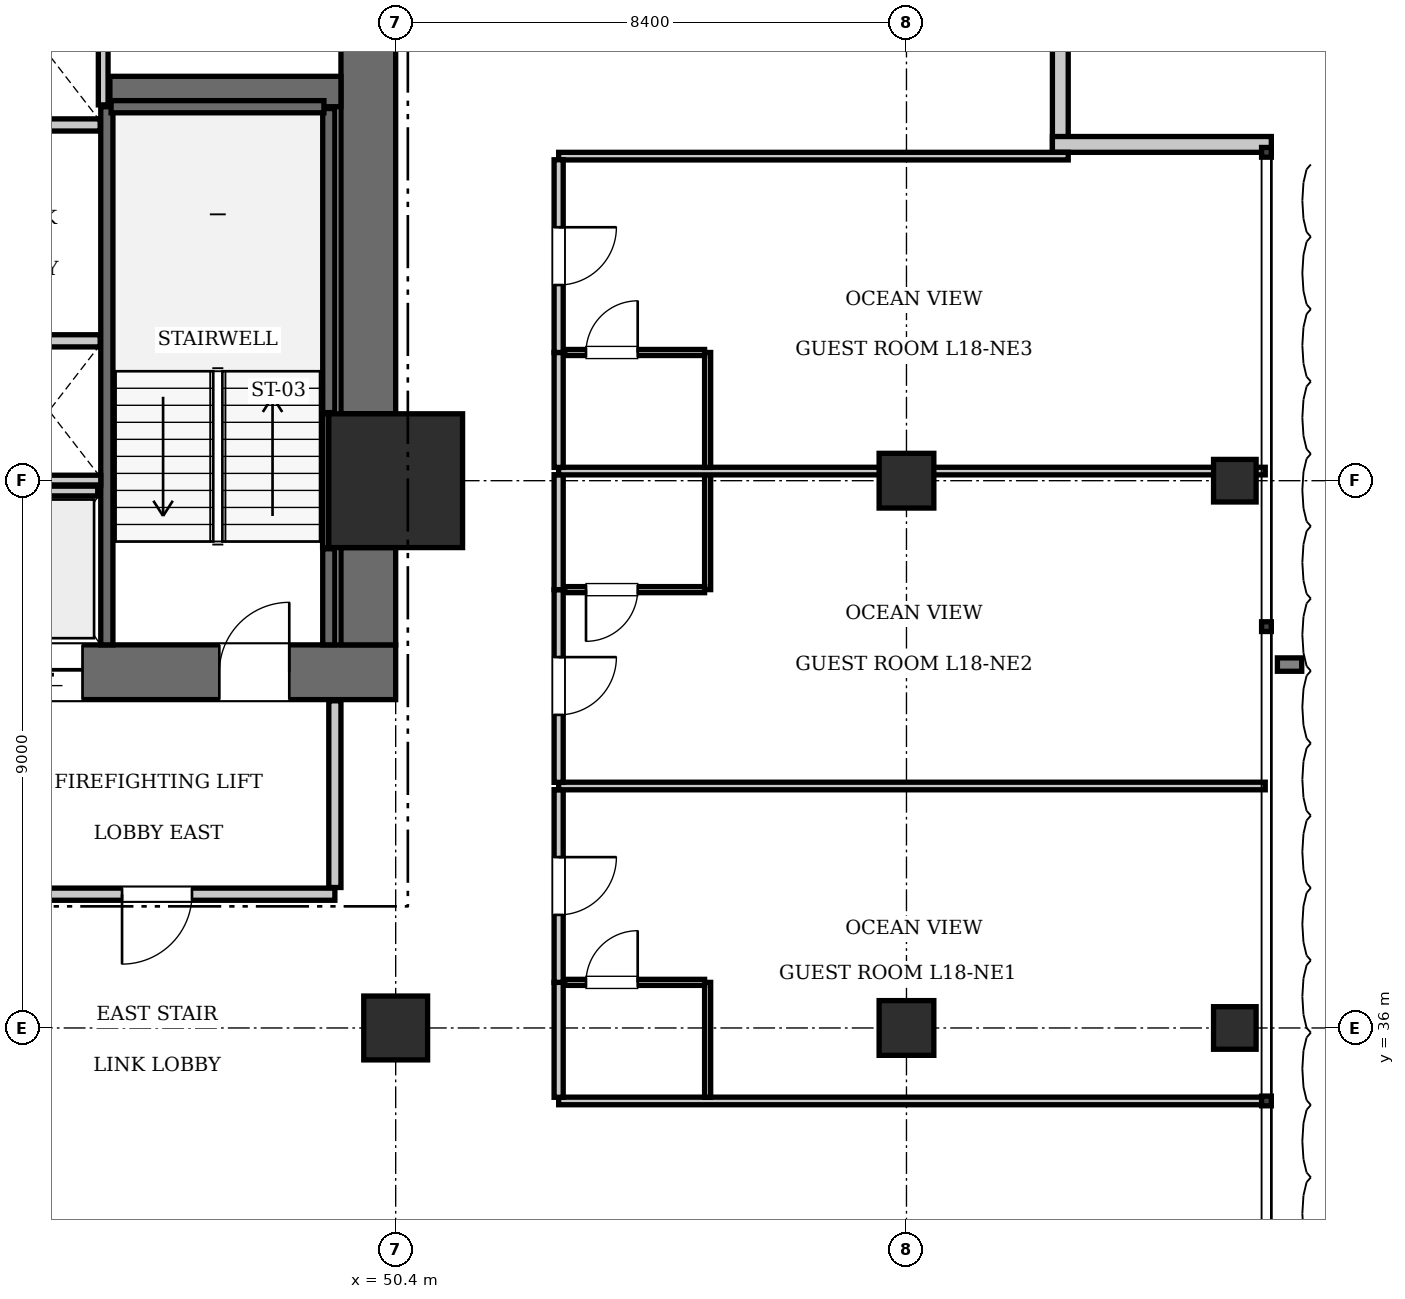
"""IFC4 building model, lengths in metres.
Left out: names, types, materials, properties, quantities, classifications, styles, units other than length and angle.
Written with IfcOpenShell. Run it as: python <this file> out.ifc"""

import sys

from ifc_helpers import new_model, si_unit, direction, frame, frame_2d, origin, origin_2d, place, context, subcontext, project, spatial, rectangle, i_section, extrude, element, fill, save


model = new_model("IFC4")
c1 = context("Model", 3, precision=1e-05, world=origin(), true_north=direction((0.0, 1.0)))
c2 = subcontext(c1, "Body", "Model", "MODEL_VIEW")
j1 = project(units=[si_unit("LENGTHUNIT", "METRE"), si_unit("PLANEANGLEUNIT", "RADIAN")], contexts=[c1])
p1 = place(None, origin())
s1 = spatial("IfcSite", under=j1, at=p1, CompositionType="ELEMENT")
p2 = place(p1, origin())
s2 = spatial("IfcBuilding", under=s1, at=p2, CompositionType="ELEMENT")
p3 = place(p2, frame((0.0, 0.0, 77.0)))
s3 = spatial("IfcBuildingStorey", under=s2, at=p3, CompositionType="ELEMENT", Elevation=77.0)
p4 = place(p3, frame((50.4, 45.0, 0.0), z_axis=(0.0, 0.0, 1.0), x_axis=(1.0, 0.0, 0.0)))
e1 = element("IfcColumn", 1, at=p4, inside=s3, PredefinedType="COLUMN", context=c2, shape_type="SweptSolid", body=[
    extrude(rectangle(XDim=2.2, YDim=2.2, at=origin_2d()), origin(), (0.0, 0.0, 1.0), 3.85),
])
p5 = place(p3, frame((43.6, 41.85, 0.0), z_axis=(0.0, 0.0, 1.0), x_axis=(1.0, 0.0, 0.0)))
e2 = element("IfcWall", 2, at=p5, inside=s3, PredefinedType="SHEAR", context=c2, shape_type="SweptSolid", body=[
    extrude(rectangle(XDim=6.8, YDim=0.9, at=frame_2d((3.4, 0.0))), origin(), (0.0, 0.0, 1.0), 3.85),
])
p6 = place(p5, frame((3.9, 0.0, 0.0)))
e3 = element("IfcOpeningElement", 3, at=p6, cuts=e2, PredefinedType="OPENING", context=c2, shape_type="SweptSolid", body=[
    extrude(rectangle(XDim=1.15, YDim=2.15, at=frame_2d((0.575, 1.075))), frame((0.0, 0.46, 0.0), z_axis=(0.0, -1.0, 0.0), x_axis=(1.0, 0.0, 0.0)), (0.0, 0.0, 1.0), 0.92),
])
p7 = place(p5, frame((0.55, 0.0, 0.0)))
e4 = element("IfcOpeningElement", 4, at=p7, cuts=e2, PredefinedType="OPENING", context=c2, shape_type="SweptSolid", body=[
    extrude(rectangle(XDim=1.1, YDim=2.2, at=frame_2d((0.55, 1.1))), frame((0.0, 0.46, 0.0), z_axis=(0.0, -1.0, 0.0), x_axis=(1.0, 0.0, 0.0)), (0.0, 0.0, 1.0), 0.92),
])
p8 = place(p3, frame((49.95, 42.3, 0.0), z_axis=(0.0, 0.0, 1.0), x_axis=(0.0, 1.0, 0.0)))
e5 = element("IfcWall", 5, at=p8, inside=s3, PredefinedType="SHEAR", context=c2, shape_type="SweptSolid", body=[
    extrude(rectangle(XDim=1.6, YDim=0.9, at=frame_2d((0.8, 0.0))), origin(), (0.0, 0.0, 1.0), 3.85),
])
p9 = place(p3, frame((49.95, 46.1, 0.0), z_axis=(0.0, 0.0, 1.0), x_axis=(0.0, 1.0, 0.0)))
e6 = element("IfcWall", 6, at=p9, inside=s3, PredefinedType="SHEAR", context=c2, shape_type="SweptSolid", body=[
    extrude(rectangle(XDim=7.0, YDim=0.9, at=frame_2d((3.5, 0.0))), origin(), (0.0, 0.0, 1.0), 3.85),
])
p10 = place(p3, frame((45.7, 51.4, 0.0), z_axis=(0.0, 0.0, 1.0), x_axis=(1.0, 0.0, 0.0)))
e7 = element("IfcWall", 7, at=p10, inside=s3, PredefinedType="SHEAR", context=c2, shape_type="SweptSolid", body=[
    extrude(rectangle(XDim=3.8, YDim=0.5, at=frame_2d((1.9, 0.0))), origin(), (0.0, 0.0, 1.0), 3.85),
])
p11 = place(p3, frame((50.4, 36.0, 0.0), z_axis=(0.0, 0.0, 1.0), x_axis=(1.0, 0.0, 0.0)))
e8 = element("IfcColumn", 8, at=p11, inside=s3, PredefinedType="COLUMN", context=c2, shape_type="SweptSolid", body=[
    extrude(rectangle(XDim=1.05, YDim=1.05, at=origin_2d()), origin(), (0.0, 0.0, 1.0), 3.85),
])
for number, where, z_axis, x_axis in (
    (9, (58.8, 36.0, 0.0), (0.0, 0.0, 1.0), (1.0, 0.0, 0.0)),
    (10, (58.8, 45.0, 0.0), (0.0, 0.0, 1.0), (1.0, 0.0, 0.0)),
):
    element("IfcColumn", number, at=place(p3, frame(where, z_axis=z_axis, x_axis=x_axis)), inside=s3, PredefinedType="COLUMN", context=c2, shape_type="SweptSolid", body=[
        extrude(rectangle(XDim=0.9, YDim=0.9, at=origin_2d()), origin(), (0.0, 0.0, 1.0), 3.85),
    ])
for number, where, z_axis, x_axis in (
    (11, (64.2, 36.0, 0.0), (0.0, 0.0, 1.0), (1.0, 0.0, 0.0)),
    (12, (64.2, 45.0, 0.0), (0.0, 0.0, 1.0), (1.0, 0.0, 0.0)),
):
    element("IfcColumn", number, at=place(p3, frame(where, z_axis=z_axis, x_axis=x_axis)), inside=s3, PredefinedType="COLUMN", context=c2, shape_type="SweptSolid", body=[
        extrude(i_section(OverallWidth=0.7, OverallDepth=0.7, WebThickness=0.028, FlangeThickness=0.044, at=origin_2d()), origin(), (0.0, 0.0, 1.0), 3.85),
    ])
p12 = place(p3, frame((45.65, 42.3, 0.0), z_axis=(0.0, 0.0, 1.0), x_axis=(0.0, 1.0, 0.0)))
e13 = element("IfcWall", 13, at=p12, inside=s3, PredefinedType="SOLIDWALL", context=c2, shape_type="SweptSolid", body=[
    extrude(rectangle(XDim=8.85, YDim=0.2, at=frame_2d((4.425, 0.0))), origin(), (0.0, 0.0, 1.0), 3.61),
])
p13 = place(p3, frame((49.3, 42.3, 0.0), z_axis=(0.0, 0.0, 1.0), x_axis=(0.0, 1.0, 0.0)))
e14 = element("IfcWall", 14, at=p13, inside=s3, PredefinedType="SOLIDWALL", context=c2, shape_type="SweptSolid", body=[
    extrude(rectangle(XDim=1.58, YDim=0.2, at=frame_2d((0.79, 0.0))), origin(), (0.0, 0.0, 1.0), 3.61),
])
p14 = place(p3, frame((49.3, 46.12, 0.0), z_axis=(0.0, 0.0, 1.0), x_axis=(0.0, 1.0, 0.0)))
e15 = element("IfcWall", 15, at=p14, inside=s3, PredefinedType="SOLIDWALL", context=c2, shape_type="SweptSolid", body=[
    extrude(rectangle(XDim=5.0, YDim=0.2, at=frame_2d((2.5, 0.0))), origin(), (0.0, 0.0, 1.0), 3.61),
])
p15 = place(p3, frame((45.72, 51.15, 0.0), z_axis=(0.0, 0.0, 1.0), x_axis=(1.0, 0.0, 0.0)))
e16 = element("IfcWall", 16, at=p15, inside=s3, PredefinedType="SOLIDWALL", context=c2, shape_type="SweptSolid", body=[
    extrude(rectangle(XDim=3.5, YDim=0.2, at=frame_2d((1.75, 0.0))), origin(), (0.0, 0.0, 1.0), 3.61),
])
p16 = place(p3, frame((49.248, 43.9, 0.0), z_axis=(0.0, 0.0, 1.0), x_axis=(0.0, 1.0, 0.0)))
e17 = element("IfcWall", 17, at=p16, inside=s3, PredefinedType="SOLIDWALL", context=c2, shape_type="SweptSolid", body=[
    extrude(rectangle(XDim=2.2, YDim=0.1, at=frame_2d((1.1, 0.0))), origin(), (0.0, 0.0, 1.0), 3.61),
])
for number, where, z_axis, x_axis in (
    (18, (43.86, 47.3, 0.0), (0.0, 0.0, 1.0), (1.0, 0.0, 0.0)),
    (19, (43.86, 50.85, 0.0), (0.0, 0.0, 1.0), (1.0, 0.0, 0.0)),
):
    element("IfcWall", number, at=place(p3, frame(where, z_axis=z_axis, x_axis=x_axis)), inside=s3, PredefinedType="SOLIDWALL", context=c2, shape_type="SweptSolid", body=[
        extrude(rectangle(XDim=1.68, YDim=0.2, at=frame_2d((0.84, 0.0))), origin(), (0.0, 0.0, 1.0), 3.61),
    ])
p17 = place(p3, frame((43.9, 44.83, 0.0), z_axis=(0.0, 0.0, 1.0), x_axis=(1.0, 0.0, 0.0)))
e20 = element("IfcWall", 20, at=p17, inside=s3, PredefinedType="SOLIDWALL", context=c2, shape_type="SweptSolid", body=[
    extrude(rectangle(XDim=1.6, YDim=0.16, at=frame_2d((0.8, 0.0))), origin(), (0.0, 0.0, 1.0), 3.61),
])
p18 = place(p3, frame((42.1, 45.01, 0.0), z_axis=(0.0, 0.0, 1.0), x_axis=(1.0, 0.0, 0.0)))
e21 = element("IfcWall", 21, at=p18, inside=s3, PredefinedType="SOLIDWALL", context=c2, shape_type="SweptSolid", body=[
    extrude(rectangle(XDim=3.45, YDim=0.16, at=frame_2d((1.725, 0.0))), origin(), (0.0, 0.0, 1.0), 3.61),
])
p19 = place(p3, frame((45.59, 51.18, 0.0), z_axis=(0.0, 0.0, 1.0), x_axis=(0.0, 1.0, 0.0)))
e22 = element("IfcWall", 22, at=p19, inside=s3, PredefinedType="SOLIDWALL", context=c2, shape_type="SweptSolid", body=[
    extrude(rectangle(XDim=1.92, YDim=0.16, at=frame_2d((0.96, 0.0))), origin(), (0.0, 0.0, 1.0), 3.61),
])
for number, where, z_axis, x_axis in (
    (23, (61.33, 54.0, 0.0), (0.0, 0.0, 1.0), (0.0, -1.0, 0.0)),
    (24, (61.2, 50.53, 0.0), (0.0, 0.0, 1.0), (1.0, 0.0, 0.0)),
):
    element("IfcWall", number, at=place(p3, frame(where, z_axis=z_axis, x_axis=x_axis)), inside=s3, PredefinedType="SOLIDWALL", context=c2, shape_type="SweptSolid", body=[
        extrude(rectangle(XDim=3.6, YDim=0.26, at=frame_2d((1.8, 0.0))), origin(), (0.0, 0.0, 1.0), 3.61),
    ])
p20 = place(p3, frame((43.6, 38.2, 0.0), z_axis=(0.0, 0.0, 1.0), x_axis=(1.0, 0.0, 0.0)))
e25 = element("IfcWall", 25, at=p20, inside=s3, PredefinedType="PARTITIONING", context=c2, shape_type="SweptSolid", body=[
    extrude(rectangle(XDim=5.8, YDim=0.2, at=frame_2d((2.9, 0.0))), origin(), (0.0, 0.0, 1.0), 3.61),
])
p21 = place(p20, frame((2.3, 0.0, 0.0)))
e26 = element("IfcOpeningElement", 26, at=p21, cuts=e25, PredefinedType="OPENING", context=c2, shape_type="SweptSolid", body=[
    extrude(rectangle(XDim=1.15, YDim=2.15, at=frame_2d((0.575, 1.075))), frame((0.0, 0.11, 0.0), z_axis=(0.0, -1.0, 0.0), x_axis=(1.0, 0.0, 0.0)), (0.0, 0.0, 1.0), 0.22),
])
p22 = place(p3, frame((49.4, 38.31, 0.0), z_axis=(0.0, 0.0, 1.0), x_axis=(0.0, 1.0, 0.0)))
e27 = element("IfcWall", 27, at=p22, inside=s3, PredefinedType="PARTITIONING", context=c2, shape_type="SweptSolid", body=[
    extrude(rectangle(XDim=3.07, YDim=0.2, at=frame_2d((1.535, 0.0))), origin(), (0.0, 0.0, 1.0), 3.61),
])
p23 = place(p3, frame((53.08, 34.8, 0.0), z_axis=(0.0, 0.0, 1.0), x_axis=(1.0, 0.0, 0.0)))
e28 = element("IfcWall", 28, at=p23, inside=s3, PredefinedType="PARTITIONING", context=c2, shape_type="SweptSolid", body=[
    extrude(rectangle(XDim=11.62, YDim=0.125, at=frame_2d((5.81, 0.0))), origin(), (0.0, 0.0, 1.0), 3.61),
])
p24 = place(p3, frame((53.08, 50.337, 0.0), z_axis=(0.0, 0.0, 1.0), x_axis=(1.0, 0.0, 0.0)))
e29 = element("IfcWall", 29, at=p24, inside=s3, PredefinedType="PARTITIONING", context=c2, shape_type="SweptSolid", body=[
    extrude(rectangle(XDim=8.38, YDim=0.125, at=frame_2d((4.19, 0.0))), origin(), (0.0, 0.0, 1.0), 3.61),
])
p25 = place(p3, frame((53.08, 34.86, 0.0), z_axis=(0.0, 0.0, 1.0), x_axis=(0.0, 1.0, 0.0)))
e30 = element("IfcWall", 30, at=p25, inside=s3, PredefinedType="PARTITIONING", context=c2, shape_type="SweptSolid", body=[
    extrude(rectangle(XDim=1.89, YDim=0.15, at=frame_2d((0.945, 0.0))), origin(), (0.0, 0.0, 1.0), 3.61),
])
p26 = place(p3, frame((53.08, 36.75, 0.0), z_axis=(0.0, 0.0, 1.0), x_axis=(0.0, 1.0, 0.0)))
e31 = element("IfcWall", 31, at=p26, inside=s3, PredefinedType="PARTITIONING", context=c2, shape_type="SweptSolid", body=[
    extrude(rectangle(XDim=3.169, YDim=0.15, at=frame_2d((1.584, 0.0))), origin(), (0.0, 0.0, 1.0), 3.61),
])
p27 = place(p26, frame((1.11, 0.0, 0.0)))
e32 = element("IfcOpeningElement", 32, at=p27, cuts=e31, PredefinedType="OPENING", context=c2, shape_type="SweptSolid", body=[
    extrude(rectangle(XDim=0.95, YDim=2.15, at=frame_2d((0.475, 1.075))), frame((0.0, 0.085, 0.0), z_axis=(0.0, -1.0, 0.0), x_axis=(1.0, 0.0, 0.0)), (0.0, 0.0, 1.0), 0.17),
])
p28 = place(p3, frame((55.53, 34.86, 0.0), z_axis=(0.0, 0.0, 1.0), x_axis=(0.0, 1.0, 0.0)))
e33 = element("IfcWall", 33, at=p28, inside=s3, PredefinedType="PARTITIONING", context=c2, shape_type="SweptSolid", body=[
    extrude(rectangle(XDim=1.89, YDim=0.1, at=frame_2d((0.945, 0.0))), origin(), (0.0, 0.0, 1.0), 3.61),
])
p29 = place(p3, frame((53.18, 36.75, 0.0), z_axis=(0.0, 0.0, 1.0), x_axis=(1.0, 0.0, 0.0)))
e34 = element("IfcWall", 34, at=p29, inside=s3, PredefinedType="PARTITIONING", context=c2, shape_type="SweptSolid", body=[
    extrude(rectangle(XDim=2.3, YDim=0.1, at=frame_2d((1.15, 0.0))), origin(), (0.0, 0.0, 1.0), 3.61),
])
p30 = place(p29, frame((0.35, 0.0, 0.0)))
e35 = element("IfcOpeningElement", 35, at=p30, cuts=e34, PredefinedType="OPENING", context=c2, shape_type="SweptSolid", body=[
    extrude(rectangle(XDim=0.85, YDim=2.1, at=frame_2d((0.425, 1.05))), frame((0.0, 0.06, 0.0), z_axis=(0.0, -1.0, 0.0), x_axis=(1.0, 0.0, 0.0)), (0.0, 0.0, 1.0), 0.12),
])
p31 = place(p3, frame((53.08, 39.979, 0.0), z_axis=(0.0, 0.0, 1.0), x_axis=(1.0, 0.0, 0.0)))
e36 = element("IfcWall", 36, at=p31, inside=s3, PredefinedType="PARTITIONING", context=c2, shape_type="SweptSolid", body=[
    extrude(rectangle(XDim=11.62, YDim=0.125, at=frame_2d((5.81, 0.0))), origin(), (0.0, 0.0, 1.0), 3.61),
])
p32 = place(p3, frame((53.08, 40.039, 0.0), z_axis=(0.0, 0.0, 1.0), x_axis=(0.0, 1.0, 0.0)))
e37 = element("IfcWall", 37, at=p32, inside=s3, PredefinedType="PARTITIONING", context=c2, shape_type="SweptSolid", body=[
    extrude(rectangle(XDim=3.169, YDim=0.15, at=frame_2d((1.584, 0.0))), origin(), (0.0, 0.0, 1.0), 3.61),
])
p33 = place(p32, frame((1.11, 0.0, 0.0)))
e38 = element("IfcOpeningElement", 38, at=p33, cuts=e37, PredefinedType="OPENING", context=c2, shape_type="SweptSolid", body=[
    extrude(rectangle(XDim=0.95, YDim=2.15, at=frame_2d((0.475, 1.075))), frame((0.0, 0.085, 0.0), z_axis=(0.0, -1.0, 0.0), x_axis=(1.0, 0.0, 0.0)), (0.0, 0.0, 1.0), 0.17),
])
p34 = place(p3, frame((53.08, 43.208, 0.0), z_axis=(0.0, 0.0, 1.0), x_axis=(0.0, 1.0, 0.0)))
e39 = element("IfcWall", 39, at=p34, inside=s3, PredefinedType="PARTITIONING", context=c2, shape_type="SweptSolid", body=[
    extrude(rectangle(XDim=1.89, YDim=0.15, at=frame_2d((0.945, 0.0))), origin(), (0.0, 0.0, 1.0), 3.61),
])
p35 = place(p3, frame((55.53, 43.208, 0.0), z_axis=(0.0, 0.0, 1.0), x_axis=(0.0, 1.0, 0.0)))
e40 = element("IfcWall", 40, at=p35, inside=s3, PredefinedType="PARTITIONING", context=c2, shape_type="SweptSolid", body=[
    extrude(rectangle(XDim=1.89, YDim=0.1, at=frame_2d((0.945, 0.0))), origin(), (0.0, 0.0, 1.0), 3.61),
])
p36 = place(p3, frame((53.18, 43.208, 0.0), z_axis=(0.0, 0.0, 1.0), x_axis=(1.0, 0.0, 0.0)))
e41 = element("IfcWall", 41, at=p36, inside=s3, PredefinedType="PARTITIONING", context=c2, shape_type="SweptSolid", body=[
    extrude(rectangle(XDim=2.3, YDim=0.1, at=frame_2d((1.15, 0.0))), origin(), (0.0, 0.0, 1.0), 3.61),
])
p37 = place(p36, frame((0.35, 0.0, 0.0)))
e42 = element("IfcOpeningElement", 42, at=p37, cuts=e41, PredefinedType="OPENING", context=c2, shape_type="SweptSolid", body=[
    extrude(rectangle(XDim=0.85, YDim=2.1, at=frame_2d((0.425, 1.05))), frame((0.0, 0.06, 0.0), z_axis=(0.0, -1.0, 0.0), x_axis=(1.0, 0.0, 0.0)), (0.0, 0.0, 1.0), 0.12),
])
p38 = place(p3, frame((53.08, 45.158, 0.0), z_axis=(0.0, 0.0, 1.0), x_axis=(1.0, 0.0, 0.0)))
e43 = element("IfcWall", 43, at=p38, inside=s3, PredefinedType="PARTITIONING", context=c2, shape_type="SweptSolid", body=[
    extrude(rectangle(XDim=11.62, YDim=0.125, at=frame_2d((5.81, 0.0))), origin(), (0.0, 0.0, 1.0), 2.999),
])
p39 = place(p3, frame((53.08, 45.218, 0.0), z_axis=(0.0, 0.0, 1.0), x_axis=(0.0, 1.0, 0.0)))
e44 = element("IfcWall", 44, at=p39, inside=s3, PredefinedType="PARTITIONING", context=c2, shape_type="SweptSolid", body=[
    extrude(rectangle(XDim=1.89, YDim=0.15, at=frame_2d((0.945, 0.0))), origin(), (0.0, 0.0, 1.0), 3.61),
])
p40 = place(p3, frame((53.08, 47.108, 0.0), z_axis=(0.0, 0.0, 1.0), x_axis=(0.0, 1.0, 0.0)))
e45 = element("IfcWall", 45, at=p40, inside=s3, PredefinedType="PARTITIONING", context=c2, shape_type="SweptSolid", body=[
    extrude(rectangle(XDim=3.169, YDim=0.15, at=frame_2d((1.584, 0.0))), origin(), (0.0, 0.0, 1.0), 3.61),
])
p41 = place(p40, frame((1.11, 0.0, 0.0)))
e46 = element("IfcOpeningElement", 46, at=p41, cuts=e45, PredefinedType="OPENING", context=c2, shape_type="SweptSolid", body=[
    extrude(rectangle(XDim=0.95, YDim=2.15, at=frame_2d((0.475, 1.075))), frame((0.0, 0.085, 0.0), z_axis=(0.0, -1.0, 0.0), x_axis=(1.0, 0.0, 0.0)), (0.0, 0.0, 1.0), 0.17),
])
p42 = place(p3, frame((55.53, 45.218, 0.0), z_axis=(0.0, 0.0, 1.0), x_axis=(0.0, 1.0, 0.0)))
e47 = element("IfcWall", 47, at=p42, inside=s3, PredefinedType="PARTITIONING", context=c2, shape_type="SweptSolid", body=[
    extrude(rectangle(XDim=1.89, YDim=0.1, at=frame_2d((0.945, 0.0))), origin(), (0.0, 0.0, 1.0), 3.61),
])
p43 = place(p3, frame((53.18, 47.108, 0.0), z_axis=(0.0, 0.0, 1.0), x_axis=(1.0, 0.0, 0.0)))
e48 = element("IfcWall", 48, at=p43, inside=s3, PredefinedType="PARTITIONING", context=c2, shape_type="SweptSolid", body=[
    extrude(rectangle(XDim=2.3, YDim=0.1, at=frame_2d((1.15, 0.0))), origin(), (0.0, 0.0, 1.0), 3.61),
])
p44 = place(p43, frame((0.35, 0.0, 0.0)))
e49 = element("IfcOpeningElement", 49, at=p44, cuts=e48, PredefinedType="OPENING", context=c2, shape_type="SweptSolid", body=[
    extrude(rectangle(XDim=0.85, YDim=2.1, at=frame_2d((0.425, 1.05))), frame((0.0, 0.06, 0.0), z_axis=(0.0, -1.0, 0.0), x_axis=(1.0, 0.0, 0.0)), (0.0, 0.0, 1.0), 0.12),
])
p45 = place(p6, origin())
e50 = element("IfcDoor", 50, at=p45, inside=s3, OperationType="SINGLE_SWING_RIGHT", PredefinedType="DOOR", context=c2, shape_type="SweptSolid", body=[
    extrude(rectangle(XDim=1.15, YDim=2.15, at=frame_2d((0.575, 1.075))), frame((0.0, 0.025, 0.0), z_axis=(0.0, -1.0, 0.0), x_axis=(1.0, 0.0, 0.0)), (0.0, 0.0, 1.0), 0.05),
])
fill(e3, e50)
p46 = place(p7, frame((1.1, 0.0, 0.0), z_axis=(0.0, 0.0, 1.0), x_axis=(-1.0, 0.0, 0.0)))
e51 = element("IfcDoor", 51, at=p46, inside=s3, OperationType="SLIDING_TO_LEFT", PredefinedType="DOOR", context=c2, shape_type="SweptSolid", body=[
    extrude(rectangle(XDim=1.1, YDim=2.2, at=frame_2d((0.55, 1.1))), frame((0.0, 0.025, 0.0), z_axis=(0.0, -1.0, 0.0), x_axis=(1.0, 0.0, 0.0)), (0.0, 0.0, 1.0), 0.05),
])
fill(e4, e51)
p47 = place(p21, frame((1.15, 0.0, 0.0), z_axis=(0.0, 0.0, 1.0), x_axis=(-1.0, 0.0, 0.0)))
e52 = element("IfcDoor", 52, at=p47, inside=s3, OperationType="SINGLE_SWING_RIGHT", PredefinedType="DOOR", context=c2, shape_type="SweptSolid", body=[
    extrude(rectangle(XDim=1.15, YDim=2.15, at=frame_2d((0.575, 1.075))), frame((0.0, 0.025, 0.0), z_axis=(0.0, -1.0, 0.0), x_axis=(1.0, 0.0, 0.0)), (0.0, 0.0, 1.0), 0.05),
])
fill(e26, e52)
p48 = place(p30, origin())
e53 = element("IfcDoor", 53, at=p48, inside=s3, OperationType="SINGLE_SWING_RIGHT", PredefinedType="DOOR", context=c2, shape_type="SweptSolid", body=[
    extrude(rectangle(XDim=0.85, YDim=2.1, at=frame_2d((0.425, 1.05))), frame((0.0, 0.025, 0.0), z_axis=(0.0, -1.0, 0.0), x_axis=(1.0, 0.0, 0.0)), (0.0, 0.0, 1.0), 0.05),
])
fill(e35, e53)
p49 = place(p27, frame((0.95, 0.0, 0.0), z_axis=(0.0, 0.0, 1.0), x_axis=(-1.0, 0.0, 0.0)))
e54 = element("IfcDoor", 54, at=p49, inside=s3, OperationType="SINGLE_SWING_LEFT", PredefinedType="DOOR", context=c2, shape_type="SweptSolid", body=[
    extrude(rectangle(XDim=0.95, YDim=2.15, at=frame_2d((0.475, 1.075))), frame((0.0, 0.025, 0.0), z_axis=(0.0, -1.0, 0.0), x_axis=(1.0, 0.0, 0.0)), (0.0, 0.0, 1.0), 0.05),
])
fill(e32, e54)
p50 = place(p37, frame((0.85, 0.0, 0.0), z_axis=(0.0, 0.0, 1.0), x_axis=(-1.0, 0.0, 0.0)))
e55 = element("IfcDoor", 55, at=p50, inside=s3, OperationType="SINGLE_SWING_RIGHT", PredefinedType="DOOR", context=c2, shape_type="SweptSolid", body=[
    extrude(rectangle(XDim=0.85, YDim=2.1, at=frame_2d((0.425, 1.05))), frame((0.0, 0.025, 0.0), z_axis=(0.0, -1.0, 0.0), x_axis=(1.0, 0.0, 0.0)), (0.0, 0.0, 1.0), 0.05),
])
fill(e42, e55)
p51 = place(p33, frame((0.95, 0.0, 0.0), z_axis=(0.0, 0.0, 1.0), x_axis=(-1.0, 0.0, 0.0)))
e56 = element("IfcDoor", 56, at=p51, inside=s3, OperationType="SINGLE_SWING_LEFT", PredefinedType="DOOR", context=c2, shape_type="SweptSolid", body=[
    extrude(rectangle(XDim=0.95, YDim=2.15, at=frame_2d((0.475, 1.075))), frame((0.0, 0.025, 0.0), z_axis=(0.0, -1.0, 0.0), x_axis=(1.0, 0.0, 0.0)), (0.0, 0.0, 1.0), 0.05),
])
fill(e38, e56)
p52 = place(p44, origin())
e57 = element("IfcDoor", 57, at=p52, inside=s3, OperationType="SINGLE_SWING_RIGHT", PredefinedType="DOOR", context=c2, shape_type="SweptSolid", body=[
    extrude(rectangle(XDim=0.85, YDim=2.1, at=frame_2d((0.425, 1.05))), frame((0.0, 0.025, 0.0), z_axis=(0.0, -1.0, 0.0), x_axis=(1.0, 0.0, 0.0)), (0.0, 0.0, 1.0), 0.05),
])
fill(e49, e57)
p53 = place(p41, frame((0.95, 0.0, 0.0), z_axis=(0.0, 0.0, 1.0), x_axis=(-1.0, 0.0, 0.0)))
e58 = element("IfcDoor", 58, at=p53, inside=s3, OperationType="SINGLE_SWING_LEFT", PredefinedType="DOOR", context=c2, shape_type="SweptSolid", body=[
    extrude(rectangle(XDim=0.95, YDim=2.15, at=frame_2d((0.475, 1.075))), frame((0.0, 0.025, 0.0), z_axis=(0.0, -1.0, 0.0), x_axis=(1.0, 0.0, 0.0)), (0.0, 0.0, 1.0), 0.05),
])
fill(e46, e58)
save(model, sys.argv[1])
